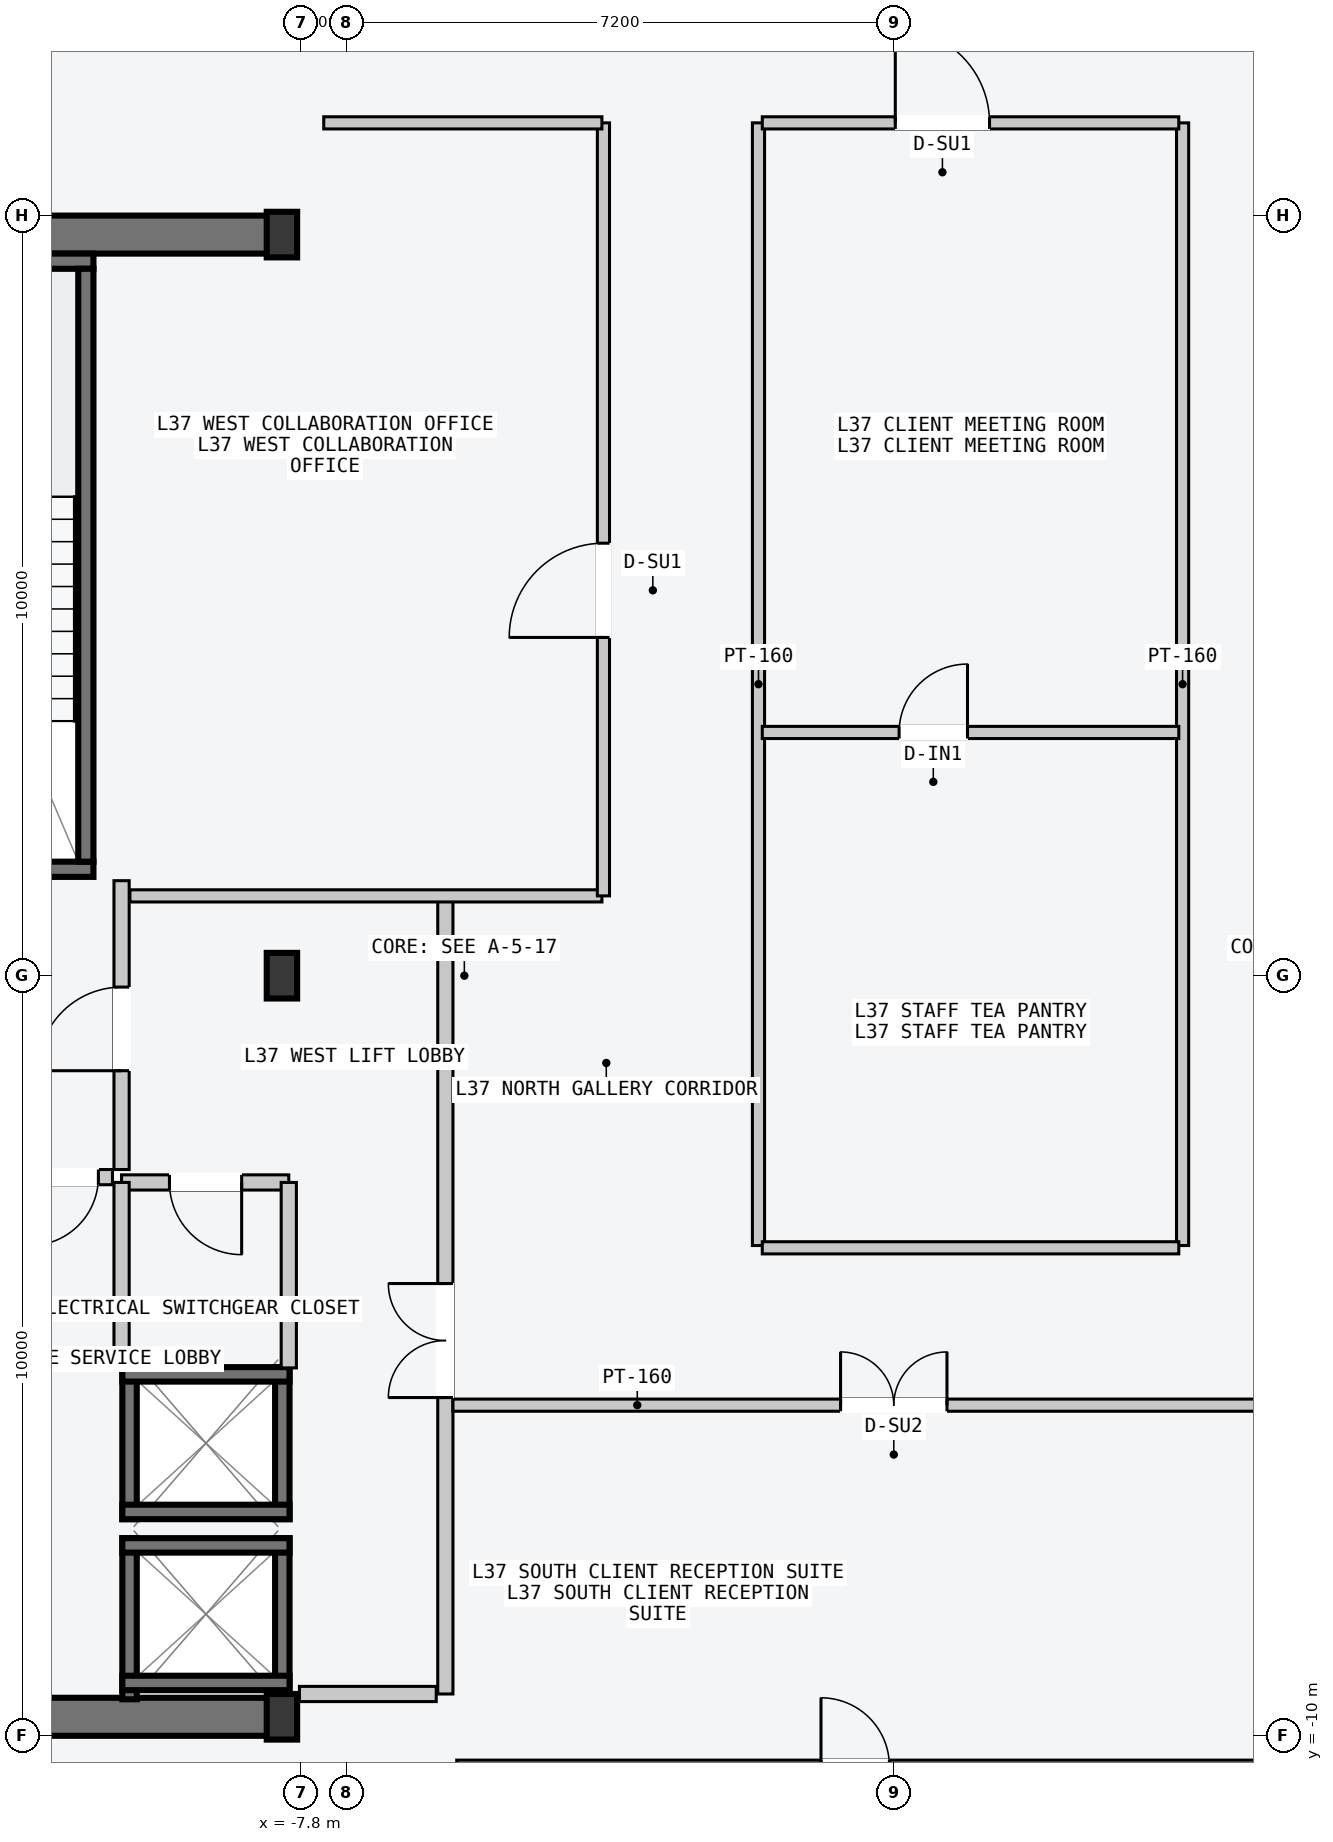
"""IFC4 building model, lengths in metres.
Left out: names, types, materials, properties, quantities, classifications, styles, units other than length and angle.
Written with IfcOpenShell. Run it as: python <this file> out.ifc"""

import sys

from ifc_helpers import new_model, si_unit, direction, frame, frame_2d, origin, origin_2d, place, context, subcontext, project, spatial, rectangle, i_section, extrude, element, fill, save


model = new_model("IFC4")
c1 = context("Model", 3, precision=1e-05, world=origin(), true_north=direction((0.0, 1.0)))
c2 = subcontext(c1, "Body", "Model", "MODEL_VIEW")
j1 = project(units=[si_unit("LENGTHUNIT", "METRE"), si_unit("PLANEANGLEUNIT", "RADIAN")], contexts=[c1])
p1 = place(None, origin())
s1 = spatial("IfcSite", under=j1, at=p1, CompositionType="ELEMENT")
p2 = place(p1, origin())
s2 = spatial("IfcBuilding", under=s1, at=p2, CompositionType="ELEMENT")
p3 = place(p2, frame((0.0, 0.0, 142.2)))
s3 = spatial("IfcBuildingStorey", under=s2, at=p3, CompositionType="ELEMENT", Elevation=142.2)
for number, where, z_axis, x_axis in (
    (1, (-14.53, -9.75, -0.2), (0.0, 0.0, 1.0), (1.0, 0.0, 0.0)),
    (2, (-14.53, 9.75, -0.2), (0.0, 0.0, 1.0), (1.0, 0.0, 0.0)),
):
    element("IfcWall", number, at=place(p3, frame(where, z_axis=z_axis, x_axis=x_axis)), inside=s3, PredefinedType="SHEAR", context=c2, shape_type="SweptSolid", body=[
        extrude(rectangle(XDim=6.46, YDim=0.5, at=frame_2d((3.23, 0.0))), origin(), (0.0, 0.0, 1.0), 3.6),
    ])
p4 = place(p3, frame((-14.25, 1.4, -0.2), z_axis=(0.0, 0.0, 1.0), x_axis=(1.0, 0.0, 0.0)))
e3 = element("IfcWall", 3, at=p4, inside=s3, PredefinedType="SOLIDWALL", context=c2, shape_type="SweptSolid", body=[
    extrude(rectangle(XDim=3.72, YDim=0.2, at=frame_2d((1.86, 0.0))), origin(), (0.0, 0.0, 1.0), 3.6),
])
p5 = place(p4, frame((1.5, 0.0, 0.2)))
e4 = element("IfcOpeningElement", 4, at=p5, cuts=e3, PredefinedType="OPENING", context=c2, shape_type="SweptSolid", body=[
    extrude(rectangle(XDim=1.12, YDim=2.18, at=frame_2d((0.56, 1.09))), frame((0.0, 0.11, 0.0), z_axis=(0.0, -1.0, 0.0), x_axis=(1.0, 0.0, 0.0)), (0.0, 0.0, 1.0), 0.22),
])
p6 = place(p3, frame((-14.25, 9.4, -0.2), z_axis=(0.0, 0.0, 1.0), x_axis=(1.0, 0.0, 0.0)))
e5 = element("IfcWall", 5, at=p6, inside=s3, PredefinedType="SOLIDWALL", context=c2, shape_type="SweptSolid", body=[
    extrude(rectangle(XDim=3.72, YDim=0.2, at=frame_2d((1.86, 0.0))), origin(), (0.0, 0.0, 1.0), 3.6),
])
p7 = place(p3, frame((-10.63, 1.5, -0.2), z_axis=(0.0, 0.0, 1.0), x_axis=(0.0, 1.0, 0.0)))
e6 = element("IfcWall", 6, at=p7, inside=s3, PredefinedType="SOLIDWALL", context=c2, shape_type="SweptSolid", body=[
    extrude(rectangle(XDim=7.8, YDim=0.2, at=frame_2d((3.9, 0.0))), origin(), (0.0, 0.0, 1.0), 3.6),
])
for number, where, z_axis, x_axis in (
    (7, (-8.05, -9.75, 0.0), (0.0, 0.0, 1.0), (1.0, 0.0, 0.0)),
    (8, (-8.05, 0.0, 0.0), (0.0, 0.0, 1.0), (1.0, 0.0, 0.0)),
    (9, (-8.05, 9.75, 0.0), (0.0, 0.0, 1.0), (1.0, 0.0, 0.0)),
):
    element("IfcColumn", number, at=place(p3, frame(where, z_axis=z_axis, x_axis=x_axis)), inside=s3, PredefinedType="COLUMN", context=c2, shape_type="SweptSolid", body=[
        extrude(i_section(OverallWidth=0.4, OverallDepth=0.6, WebThickness=0.022, FlangeThickness=0.036, at=origin_2d()), origin(), (0.0, 0.0, 1.0), 3.6),
    ])
for number, where, z_axis, x_axis in (
    (10, (-8.045, -9.52, -0.2), (0.0, 0.0, 1.0), (0.0, 1.0, 0.0)),
    (11, (-10.055, -9.52, -0.2), (0.0, 0.0, 1.0), (0.0, 1.0, 0.0)),
):
    element("IfcWall", number, at=place(p3, frame(where, z_axis=z_axis, x_axis=x_axis)), inside=s3, PredefinedType="SOLIDWALL", context=c2, shape_type="SweptSolid", body=[
        extrude(rectangle(XDim=2.12, YDim=0.19, at=frame_2d((1.06, 0.0))), origin(), (0.0, 0.0, 1.0), 3.6),
    ])
for number, where, z_axis, x_axis in (
    (12, (-10.15, -7.495, -0.2), (0.0, 0.0, 1.0), (1.0, 0.0, 0.0)),
    (13, (-10.15, -9.305, -0.2), (0.0, 0.0, 1.0), (1.0, 0.0, 0.0)),
):
    element("IfcWall", number, at=place(p3, frame(where, z_axis=z_axis, x_axis=x_axis)), inside=s3, PredefinedType="SOLIDWALL", context=c2, shape_type="SweptSolid", body=[
        extrude(rectangle(XDim=2.2, YDim=0.19, at=frame_2d((1.1, 0.0))), origin(), (0.0, 0.0, 1.0), 3.6),
    ])
for number, where, z_axis, x_axis in (
    (14, (-8.045, -7.15, -0.2), (0.0, 0.0, 1.0), (0.0, 1.0, 0.0)),
    (15, (-10.055, -7.15, -0.2), (0.0, 0.0, 1.0), (0.0, 1.0, 0.0)),
):
    element("IfcWall", number, at=place(p3, frame(where, z_axis=z_axis, x_axis=x_axis)), inside=s3, PredefinedType="SOLIDWALL", context=c2, shape_type="SweptSolid", body=[
        extrude(rectangle(XDim=2.0, YDim=0.19, at=frame_2d((1.0, 0.0))), origin(), (0.0, 0.0, 1.0), 3.6),
    ])
for number, where, z_axis, x_axis in (
    (16, (-10.15, -5.245, -0.2), (0.0, 0.0, 1.0), (1.0, 0.0, 0.0)),
    (17, (-10.15, -7.055, -0.2), (0.0, 0.0, 1.0), (1.0, 0.0, 0.0)),
):
    element("IfcWall", number, at=place(p3, frame(where, z_axis=z_axis, x_axis=x_axis)), inside=s3, PredefinedType="SOLIDWALL", context=c2, shape_type="SweptSolid", body=[
        extrude(rectangle(XDim=2.2, YDim=0.19, at=frame_2d((1.1, 0.0))), origin(), (0.0, 0.0, 1.0), 3.6),
    ])
p8 = place(p3, frame((-5.9, -9.45, 0.0), z_axis=(0.0, 0.0, 1.0), x_axis=(0.0, 1.0, 0.0)))
e18 = element("IfcWall", 18, at=p8, inside=s3, PredefinedType="PARTITIONING", context=c2, shape_type="SweptSolid", body=[
    extrude(rectangle(XDim=10.5, YDim=0.2, at=frame_2d((5.25, 0.0))), origin(), (0.0, 0.0, 1.0), 3.4),
])
p9 = place(p8, frame((3.9, 0.0, 0.0)))
e19 = element("IfcOpeningElement", 19, at=p9, cuts=e18, PredefinedType="OPENING", context=c2, shape_type="SweptSolid", body=[
    extrude(rectangle(XDim=1.5, YDim=2.2, at=frame_2d((0.75, 1.1))), frame((0.0, 0.11, 0.0), z_axis=(0.0, -1.0, 0.0), x_axis=(1.0, 0.0, 0.0)), (0.0, 0.0, 1.0), 0.22),
])
p10 = place(p3, frame((-6.02, -9.45, 0.0), z_axis=(0.0, 0.0, 1.0), x_axis=(-1.0, 0.0, 0.0)))
e20 = element("IfcWall", 20, at=p10, inside=s3, PredefinedType="PARTITIONING", context=c2, shape_type="SweptSolid", body=[
    extrude(rectangle(XDim=1.8, YDim=0.2, at=frame_2d((0.9, 0.0))), origin(), (0.0, 0.0, 1.0), 3.4),
])
p11 = place(p3, frame((-10.16, -2.55, 0.0), z_axis=(0.0, 0.0, 1.0), x_axis=(0.0, 1.0, 0.0)))
e21 = element("IfcWall", 21, at=p11, inside=s3, PredefinedType="PARTITIONING", context=c2, shape_type="SweptSolid", body=[
    extrude(rectangle(XDim=3.8, YDim=0.2, at=frame_2d((1.9, 0.0))), origin(), (0.0, 0.0, 1.0), 3.4),
])
p12 = place(p11, frame((1.3, 0.0, 0.0)))
e22 = element("IfcOpeningElement", 22, at=p12, cuts=e21, PredefinedType="OPENING", context=c2, shape_type="SweptSolid", body=[
    extrude(rectangle(XDim=1.1, YDim=2.15, at=frame_2d((0.55, 1.075))), frame((0.0, 0.11, 0.0), z_axis=(0.0, -1.0, 0.0), x_axis=(1.0, 0.0, 0.0)), (0.0, 0.0, 1.0), 0.22),
])
p13 = place(p3, frame((-10.28, -2.65, 0.0), z_axis=(0.0, 0.0, 1.0), x_axis=(-1.0, 0.0, 0.0)))
e23 = element("IfcWall", 23, at=p13, inside=s3, PredefinedType="PARTITIONING", context=c2, shape_type="SweptSolid", body=[
    extrude(rectangle(XDim=1.27, YDim=0.2, at=frame_2d((0.635, 0.0))), origin(), (0.0, 0.0, 1.0), 3.4),
])
p14 = place(p13, frame((0.185, 0.0, 0.0)))
e24 = element("IfcOpeningElement", 24, at=p14, cuts=e23, PredefinedType="OPENING", context=c2, shape_type="SweptSolid", body=[
    extrude(rectangle(XDim=0.9, YDim=2.15, at=frame_2d((0.45, 1.075))), frame((0.0, 0.11, 0.0), z_axis=(0.0, -1.0, 0.0), x_axis=(1.0, 0.0, 0.0)), (0.0, 0.0, 1.0), 0.22),
])
p15 = place(p3, frame((-7.96, -2.72, 0.0), z_axis=(0.0, 0.0, 1.0), x_axis=(-1.0, 0.0, 0.0)))
e25 = element("IfcWall", 25, at=p15, inside=s3, PredefinedType="PARTITIONING", context=c2, shape_type="SweptSolid", body=[
    extrude(rectangle(XDim=2.2, YDim=0.2, at=frame_2d((1.1, 0.0))), origin(), (0.0, 0.0, 1.0), 3.4),
])
p16 = place(p15, frame((0.62, 0.0, 0.0)))
e26 = element("IfcOpeningElement", 26, at=p16, cuts=e25, PredefinedType="OPENING", context=c2, shape_type="SweptSolid", body=[
    extrude(rectangle(XDim=0.95, YDim=2.1, at=frame_2d((0.475, 1.05))), frame((0.0, 0.11, 0.0), z_axis=(0.0, -1.0, 0.0), x_axis=(1.0, 0.0, 0.0)), (0.0, 0.0, 1.0), 0.22),
])
for number, where, z_axis, x_axis in (
    (27, (-7.96, -5.16, 0.0), (0.0, 0.0, 1.0), (0.0, 1.0, 0.0)),
    (28, (-10.16, -5.16, 0.0), (0.0, 0.0, 1.0), (0.0, 1.0, 0.0)),
):
    element("IfcWall", number, at=place(p3, frame(where, z_axis=z_axis, x_axis=x_axis)), inside=s3, PredefinedType="PARTITIONING", context=c2, shape_type="SweptSolid", body=[
        extrude(rectangle(XDim=2.44, YDim=0.2, at=frame_2d((1.22, 0.0))), origin(), (0.0, 0.0, 1.0), 3.4),
    ])
p17 = place(p3, frame((-10.05, 1.05, 0.0), z_axis=(0.0, 0.0, 1.0), x_axis=(1.0, 0.0, 0.0)))
e29 = element("IfcWall", 29, at=p17, inside=s3, PredefinedType="PARTITIONING", context=c2, shape_type="SweptSolid", body=[
    extrude(rectangle(XDim=6.21, YDim=0.16, at=frame_2d((3.105, 0.0))), origin(), (0.0, 0.0, 1.0), 3.4),
])
p18 = place(p3, frame((-3.82, 1.05, 0.0), z_axis=(0.0, 0.0, 1.0), x_axis=(0.0, 1.0, 0.0)))
e30 = element("IfcWall", 30, at=p18, inside=s3, PredefinedType="PARTITIONING", context=c2, shape_type="SweptSolid", body=[
    extrude(rectangle(XDim=10.17, YDim=0.16, at=frame_2d((5.085, 0.0))), origin(), (0.0, 0.0, 1.0), 3.4),
])
p19 = place(p18, frame((3.4, 0.0, 0.0)))
e31 = element("IfcOpeningElement", 31, at=p19, cuts=e30, PredefinedType="OPENING", context=c2, shape_type="SweptSolid", body=[
    extrude(rectangle(XDim=1.24, YDim=2.24, at=frame_2d((0.62, 1.12))), frame((0.0, 0.09, 0.0), z_axis=(0.0, -1.0, 0.0), x_axis=(1.0, 0.0, 0.0)), (0.0, 0.0, 1.0), 0.18),
])
p20 = place(p3, frame((-7.5, 11.22, 0.0), z_axis=(0.0, 0.0, 1.0), x_axis=(1.0, 0.0, 0.0)))
e32 = element("IfcWall", 32, at=p20, inside=s3, PredefinedType="PARTITIONING", context=c2, shape_type="SweptSolid", body=[
    extrude(rectangle(XDim=3.66, YDim=0.16, at=frame_2d((1.83, 0.0))), origin(), (0.0, 0.0, 1.0), 3.4),
])
for number, where, z_axis, x_axis in (
    (33, (-1.78, -3.55, 0.0), (0.0, 0.0, 1.0), (0.0, 1.0, 0.0)),
    (34, (3.8, -3.55, 0.0), (0.0, 0.0, 1.0), (0.0, 1.0, 0.0)),
):
    element("IfcWall", number, at=place(p3, frame(where, z_axis=z_axis, x_axis=x_axis)), inside=s3, PredefinedType="PARTITIONING", context=c2, shape_type="SweptSolid", body=[
        extrude(rectangle(XDim=14.77, YDim=0.16, at=frame_2d((7.385, 0.0))), origin(), (0.0, 0.0, 1.0), 3.4),
    ])
p21 = place(p3, frame((-1.73, -3.58, 0.0), z_axis=(0.0, 0.0, 1.0), x_axis=(1.0, 0.0, 0.0)))
e35 = element("IfcWall", 35, at=p21, inside=s3, PredefinedType="PARTITIONING", context=c2, shape_type="SweptSolid", body=[
    extrude(rectangle(XDim=5.48, YDim=0.16, at=frame_2d((2.74, 0.0))), origin(), (0.0, 0.0, 1.0), 3.4),
])
p22 = place(p3, frame((-1.73, 3.2, 0.0), z_axis=(0.0, 0.0, 1.0), x_axis=(1.0, 0.0, 0.0)))
e36 = element("IfcWall", 36, at=p22, inside=s3, PredefinedType="PARTITIONING", context=c2, shape_type="SweptSolid", body=[
    extrude(rectangle(XDim=5.48, YDim=0.16, at=frame_2d((2.74, 0.0))), origin(), (0.0, 0.0, 1.0), 3.4),
])
p23 = place(p22, frame((1.8, 0.0, 0.0)))
e37 = element("IfcOpeningElement", 37, at=p23, cuts=e36, PredefinedType="OPENING", context=c2, shape_type="SweptSolid", body=[
    extrude(rectangle(XDim=0.9, YDim=2.15, at=frame_2d((0.45, 1.075))), frame((0.0, 0.09, 0.0), z_axis=(0.0, -1.0, 0.0), x_axis=(1.0, 0.0, 0.0)), (0.0, 0.0, 1.0), 0.18),
])
p24 = place(p3, frame((-1.73, 11.22, 0.0), z_axis=(0.0, 0.0, 1.0), x_axis=(1.0, 0.0, 0.0)))
e38 = element("IfcWall", 38, at=p24, inside=s3, PredefinedType="PARTITIONING", context=c2, shape_type="SweptSolid", body=[
    extrude(rectangle(XDim=5.48, YDim=0.16, at=frame_2d((2.74, 0.0))), origin(), (0.0, 0.0, 1.0), 3.4),
])
p25 = place(p24, frame((1.75, 0.0, 0.0)))
e39 = element("IfcOpeningElement", 39, at=p25, cuts=e38, PredefinedType="OPENING", context=c2, shape_type="SweptSolid", body=[
    extrude(rectangle(XDim=1.24, YDim=2.24, at=frame_2d((0.62, 1.12))), frame((0.0, 0.09, 0.0), z_axis=(0.0, -1.0, 0.0), x_axis=(1.0, 0.0, 0.0)), (0.0, 0.0, 1.0), 0.18),
])
p26 = place(p3, frame((-5.8, -5.65, 0.0), z_axis=(0.0, 0.0, 1.0), x_axis=(1.0, 0.0, 0.0)))
e40 = element("IfcWall", 40, at=p26, inside=s3, PredefinedType="PARTITIONING", context=c2, shape_type="SweptSolid", body=[
    extrude(rectangle(XDim=11.6, YDim=0.16, at=frame_2d((5.8, 0.0))), origin(), (0.0, 0.0, 1.0), 3.4),
])
p27 = place(p26, frame((5.1, 0.0, 0.0)))
e41 = element("IfcOpeningElement", 41, at=p27, cuts=e40, PredefinedType="OPENING", context=c2, shape_type="SweptSolid", body=[
    extrude(rectangle(XDim=1.4, YDim=2.2, at=frame_2d((0.7, 1.1))), frame((0.0, 0.09, 0.0), z_axis=(0.0, -1.0, 0.0), x_axis=(1.0, 0.0, 0.0)), (0.0, 0.0, 1.0), 0.18),
])
p28 = place(p3, frame((-5.75, -10.4, 0.0), z_axis=(0.0, 0.0, 1.0), x_axis=(1.0, 0.0, 0.0)))
e42 = element("IfcWall", 42, at=p28, inside=s3, PredefinedType="PARTITIONING", context=c2, shape_type="SweptSolid", body=[
    extrude(rectangle(XDim=11.5, YDim=0.16, at=frame_2d((5.75, 0.0))), origin(), (0.0, 0.0, 1.0), 3.4),
])
p29 = place(p28, frame((4.792, 0.0, 0.0)))
e43 = element("IfcOpeningElement", 43, at=p29, cuts=e42, PredefinedType="OPENING", context=c2, shape_type="SweptSolid", body=[
    extrude(rectangle(XDim=0.9, YDim=2.15, at=frame_2d((0.45, 1.075))), frame((0.0, 0.09, 0.0), z_axis=(0.0, -1.0, 0.0), x_axis=(1.0, 0.0, 0.0)), (0.0, 0.0, 1.0), 0.18),
])
p30 = place(p9, origin())
e44 = element("IfcDoor", 44, at=p30, inside=s3, OperationType="DOUBLE_DOOR_SINGLE_SWING", PredefinedType="DOOR", context=c2, shape_type="SweptSolid", body=[
    extrude(rectangle(XDim=1.5, YDim=2.2, at=frame_2d((0.75, 1.1))), frame((0.0, 0.025, 0.0), z_axis=(0.0, -1.0, 0.0), x_axis=(1.0, 0.0, 0.0)), (0.0, 0.0, 1.0), 0.05),
])
fill(e19, e44)
p31 = place(p12, origin())
e45 = element("IfcDoor", 45, at=p31, inside=s3, OperationType="SINGLE_SWING_LEFT", PredefinedType="DOOR", context=c2, shape_type="SweptSolid", body=[
    extrude(rectangle(XDim=1.1, YDim=2.15, at=frame_2d((0.55, 1.075))), frame((0.0, 0.025, 0.0), z_axis=(0.0, -1.0, 0.0), x_axis=(1.0, 0.0, 0.0)), (0.0, 0.0, 1.0), 0.05),
])
fill(e22, e45)
p32 = place(p14, origin())
e46 = element("IfcDoor", 46, at=p32, inside=s3, OperationType="SINGLE_SWING_RIGHT", PredefinedType="DOOR", context=c2, shape_type="SweptSolid", body=[
    extrude(rectangle(XDim=0.9, YDim=2.15, at=frame_2d((0.45, 1.075))), frame((0.0, 0.025, 0.0), z_axis=(0.0, -1.0, 0.0), x_axis=(1.0, 0.0, 0.0)), (0.0, 0.0, 1.0), 0.05),
])
fill(e24, e46)
p33 = place(p16, origin())
e47 = element("IfcDoor", 47, at=p33, inside=s3, OperationType="SINGLE_SWING_LEFT", PredefinedType="DOOR", context=c2, shape_type="SweptSolid", body=[
    extrude(rectangle(XDim=0.95, YDim=2.1, at=frame_2d((0.475, 1.05))), frame((0.0, 0.025, 0.0), z_axis=(0.0, -1.0, 0.0), x_axis=(1.0, 0.0, 0.0)), (0.0, 0.0, 1.0), 0.05),
])
fill(e26, e47)
p34 = place(p19, origin())
e48 = element("IfcDoor", 48, at=p34, inside=s3, OperationType="SINGLE_SWING_LEFT", PredefinedType="DOOR", context=c2, shape_type="SweptSolid", body=[
    extrude(rectangle(XDim=1.24, YDim=2.24, at=frame_2d((0.62, 1.12))), frame((0.0, 0.025, 0.0), z_axis=(0.0, -1.0, 0.0), x_axis=(1.0, 0.0, 0.0)), (0.0, 0.0, 1.0), 0.05),
])
fill(e31, e48)
p35 = place(p23, origin())
e49 = element("IfcDoor", 49, at=p35, inside=s3, OperationType="SINGLE_SWING_RIGHT", PredefinedType="DOOR", context=c2, shape_type="SweptSolid", body=[
    extrude(rectangle(XDim=0.9, YDim=2.15, at=frame_2d((0.45, 1.075))), frame((0.0, 0.025, 0.0), z_axis=(0.0, -1.0, 0.0), x_axis=(1.0, 0.0, 0.0)), (0.0, 0.0, 1.0), 0.05),
])
fill(e37, e49)
p36 = place(p25, origin())
e50 = element("IfcDoor", 50, at=p36, inside=s3, OperationType="SINGLE_SWING_LEFT", PredefinedType="DOOR", context=c2, shape_type="SweptSolid", body=[
    extrude(rectangle(XDim=1.24, YDim=2.24, at=frame_2d((0.62, 1.12))), frame((0.0, 0.025, 0.0), z_axis=(0.0, -1.0, 0.0), x_axis=(1.0, 0.0, 0.0)), (0.0, 0.0, 1.0), 0.05),
])
fill(e39, e50)
p37 = place(p27, origin())
e51 = element("IfcDoor", 51, at=p37, inside=s3, OperationType="DOUBLE_DOOR_SINGLE_SWING", PredefinedType="DOOR", context=c2, shape_type="SweptSolid", body=[
    extrude(rectangle(XDim=1.4, YDim=2.2, at=frame_2d((0.7, 1.1))), frame((0.0, 0.025, 0.0), z_axis=(0.0, -1.0, 0.0), x_axis=(1.0, 0.0, 0.0)), (0.0, 0.0, 1.0), 0.05),
])
fill(e41, e51)
save(model, sys.argv[1])
